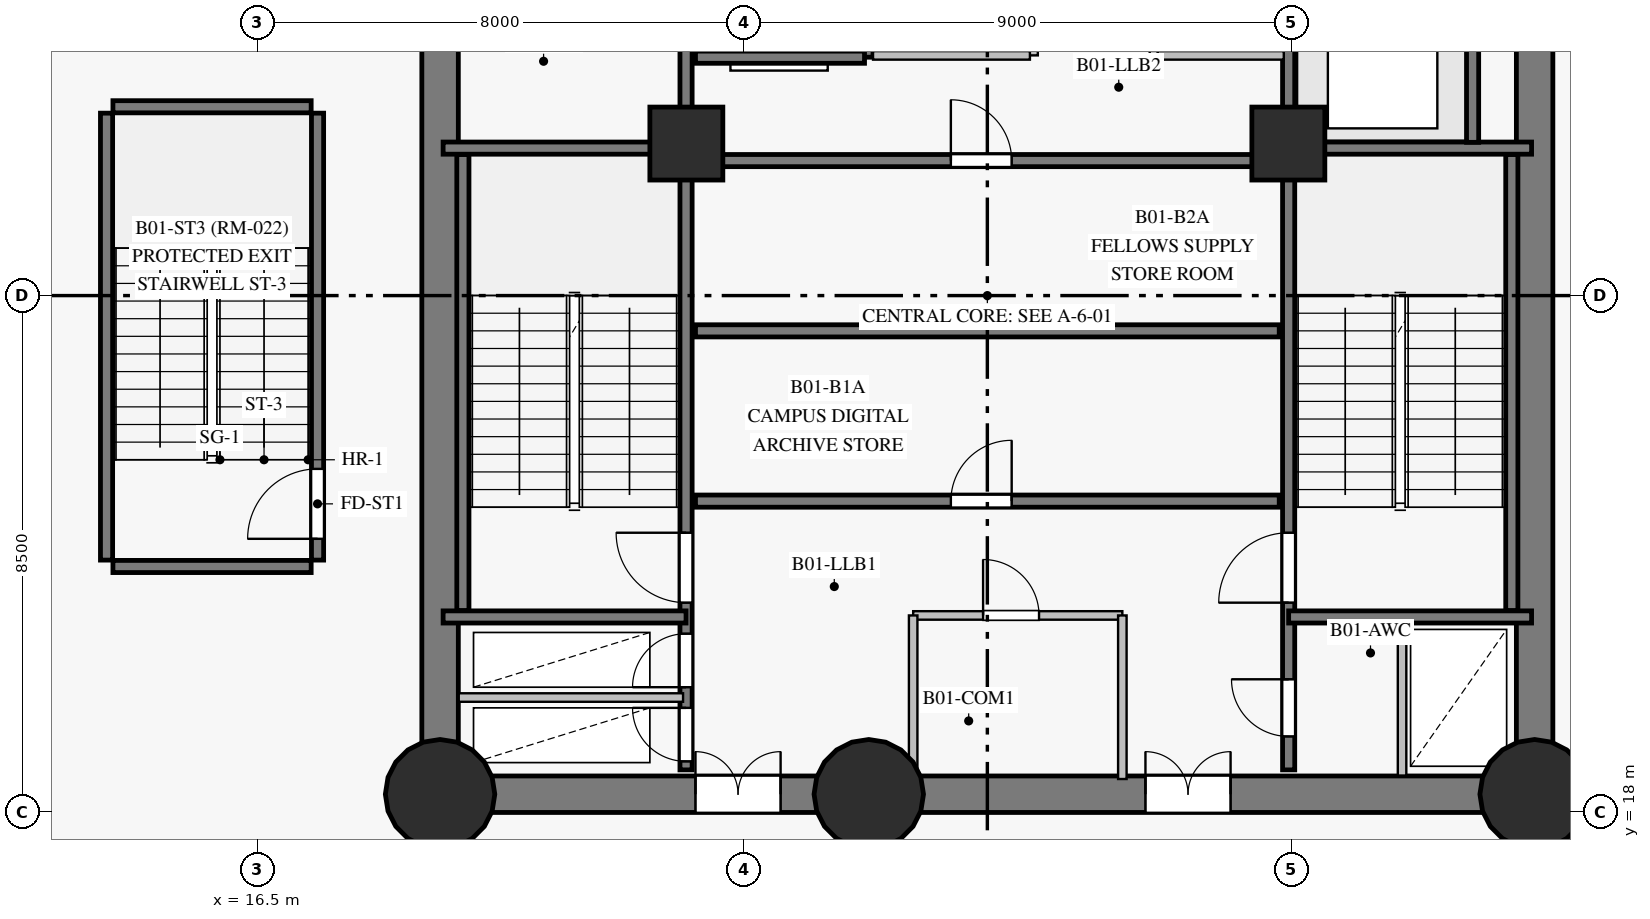
"""IFC4 building model, lengths in metres.
Left out: names, types, materials, properties, quantities, classifications, styles, units other than length and angle.
Written with IfcOpenShell. Run it as: python <this file> out.ifc"""

import sys

from ifc_helpers import new_model, si_unit, direction, frame, frame_2d, origin, origin_with_axes, origin_2d, place, context, subcontext, project, spatial, rectangle, circle, extrude, source, transform, mapped, element, fill, save


model = new_model("IFC4")
c1 = context("Model", 3, precision=1e-05, world=origin(), true_north=direction((0.0, 1.0)))
c2 = subcontext(c1, "Body", "Model", "MODEL_VIEW")
j1 = project(units=[si_unit("LENGTHUNIT", "METRE"), si_unit("PLANEANGLEUNIT", "RADIAN")], contexts=[c1])
p1 = place(None, origin())
s1 = spatial("IfcSite", under=j1, at=p1, CompositionType="ELEMENT")
p2 = place(p1, origin())
s2 = spatial("IfcBuilding", under=s1, at=p2, CompositionType="ELEMENT")
p3 = place(p2, frame((0.0, 0.0, -4.2)))
s3 = spatial("IfcBuildingStorey", under=s2, at=p3, CompositionType="ELEMENT", Elevation=-4.2)
p4 = place(p3, frame((19.5, 18.3, 0.0), z_axis=(0.0, 0.0, 1.0), x_axis=(1.0, 0.0, 0.0)))
e1 = element("IfcWall", 1, at=p4, inside=s3, PredefinedType="SHEAR", context=c2, shape_type="SweptSolid", body=[
    extrude(rectangle(XDim=7.05, YDim=0.6, at=frame_2d((3.525, 0.0))), origin(), (0.0, 0.0, 1.0), 3.85),
])
p5 = place(p4, frame((4.2, 0.0, 0.0)))
e2 = element("IfcOpeningElement", 2, at=p5, cuts=e1, PredefinedType="OPENING", context=c2, shape_type="SweptSolid", body=[
    extrude(rectangle(XDim=1.4, YDim=2.2, at=frame_2d((0.7, 1.1))), frame((0.0, 0.31, 0.0), z_axis=(0.0, -1.0, 0.0), x_axis=(1.0, 0.0, 0.0)), (0.0, 0.0, 1.0), 0.62),
])
p6 = place(p3, frame((26.55, 18.3, 0.0), z_axis=(0.0, 0.0, 1.0), x_axis=(1.0, 0.0, 0.0)))
e3 = element("IfcWall", 3, at=p6, inside=s3, PredefinedType="SHEAR", context=c2, shape_type="SweptSolid", body=[
    extrude(rectangle(XDim=10.95, YDim=0.6, at=frame_2d((5.475, 0.0))), origin(), (0.0, 0.0, 1.0), 3.85),
])
p7 = place(p6, frame((4.55, 0.0, 0.0)))
e4 = element("IfcOpeningElement", 4, at=p7, cuts=e3, PredefinedType="OPENING", context=c2, shape_type="SweptSolid", body=[
    extrude(rectangle(XDim=1.4, YDim=2.2, at=frame_2d((0.7, 1.1))), frame((0.0, 0.31, 0.0), z_axis=(0.0, -1.0, 0.0), x_axis=(1.0, 0.0, 0.0)), (0.0, 0.0, 1.0), 0.62),
])
for number, where, z_axis, x_axis in (
    (5, (37.5, 18.3, 0.0), (0.0, 0.0, 1.0), (0.0, 1.0, 0.0)),
    (6, (19.5, 34.7, 0.0), (0.0, 0.0, 1.0), (0.0, -1.0, 0.0)),
):
    element("IfcWall", number, at=place(p3, frame(where, z_axis=z_axis, x_axis=x_axis)), inside=s3, PredefinedType="SHEAR", context=c2, shape_type="SweptSolid", body=[
        extrude(rectangle(XDim=16.4, YDim=0.6, at=frame_2d((8.2, 0.0))), origin(), (0.0, 0.0, 1.0), 3.85),
    ])
m1 = source(origin_with_axes(), c2, "Body", "SweptSolid", [
    extrude(circle(Radius=0.9, at=origin_2d()), origin(), (0.0, 0.0, 1.0), 4.2),
])
for number, where, z_axis, x_axis in (
    (7, (19.5, 18.3, 0.0), (0.0, 0.0, 1.0), (1.0, 0.0, 0.0)),
    (8, (26.55, 18.3, 0.0), (0.0, 0.0, 1.0), (1.0, 0.0, 0.0)),
    (9, (37.5, 18.3, 0.0), (0.0, 0.0, 1.0), (1.0, 0.0, 0.0)),
):
    element("IfcColumn", number, at=place(p3, frame(where, z_axis=z_axis, x_axis=x_axis)), inside=s3, PredefinedType="COLUMN", context=c2, shape_type="MappedRepresentation", body=[
        mapped(m1, transform((0.0, 0.0, 0.0), scale=1.0)),
    ])
m2 = source(origin_with_axes(), c2, "Body", "SweptSolid", [
    extrude(rectangle(XDim=1.2, YDim=1.2, at=origin_2d()), origin(), (0.0, 0.0, 1.0), 4.2),
])
for number, where, z_axis, x_axis in (
    (10, (23.55, 29.0, 0.0), (0.0, 0.0, 1.0), (1.0, 0.0, 0.0)),
    (11, (33.45, 29.0, 0.0), (0.0, 0.0, 1.0), (1.0, 0.0, 0.0)),
):
    element("IfcColumn", number, at=place(p3, frame(where, z_axis=z_axis, x_axis=x_axis)), inside=s3, PredefinedType="COLUMN", context=c2, shape_type="MappedRepresentation", body=[
        mapped(m2, transform((0.0, 0.0, 0.0), scale=1.0)),
    ])
p8 = place(p3, frame((23.545, 18.7, 0.0), z_axis=(0.0, 0.0, 1.0), x_axis=(0.0, 1.0, 0.0)))
e12 = element("IfcWall", 12, at=p8, inside=s3, PredefinedType="SHEAR", context=c2, shape_type="SweptSolid", body=[
    extrude(rectangle(XDim=15.6, YDim=0.2, at=frame_2d((7.8, 0.0))), origin(), (0.0, 0.0, 1.0), 3.85),
])
p9 = place(p8, frame((2.75, 0.0, 0.0)))
e13 = element("IfcOpeningElement", 13, at=p9, cuts=e12, PredefinedType="OPENING", context=c2, shape_type="SweptSolid", body=[
    extrude(rectangle(XDim=1.15, YDim=2.15, at=frame_2d((0.575, 1.075))), frame((0.0, 0.11, 0.0), z_axis=(0.0, -1.0, 0.0), x_axis=(1.0, 0.0, 0.0)), (0.0, 0.0, 1.0), 0.22),
])
p10 = place(p8, frame((0.14, 0.0, 0.0)))
e14 = element("IfcOpeningElement", 14, at=p10, cuts=e12, PredefinedType="OPENING", context=c2, shape_type="SweptSolid", body=[
    extrude(rectangle(XDim=0.88, YDim=2.1, at=frame_2d((0.44, 1.05))), frame((0.0, 0.11, 0.0), z_axis=(0.0, -1.0, 0.0), x_axis=(1.0, 0.0, 0.0)), (0.0, 0.0, 1.0), 0.22),
])
p11 = place(p8, frame((1.36, 0.0, 0.0)))
e15 = element("IfcOpeningElement", 15, at=p11, cuts=e12, PredefinedType="OPENING", context=c2, shape_type="SweptSolid", body=[
    extrude(rectangle(XDim=0.88, YDim=2.1, at=frame_2d((0.44, 1.05))), frame((0.0, 0.11, 0.0), z_axis=(0.0, -1.0, 0.0), x_axis=(1.0, 0.0, 0.0)), (0.0, 0.0, 1.0), 0.22),
])
p12 = place(p8, frame((12.1, 0.0, 0.0)))
e16 = element("IfcOpeningElement", 16, at=p12, cuts=e12, PredefinedType="OPENING", context=c2, shape_type="SweptSolid", body=[
    extrude(rectangle(XDim=1.12, YDim=2.15, at=frame_2d((0.56, 1.075))), frame((0.0, 0.11, 0.0), z_axis=(0.0, -1.0, 0.0), x_axis=(1.0, 0.0, 0.0)), (0.0, 0.0, 1.0), 0.22),
])
p13 = place(p8, frame((14.05, 0.0, 0.0)))
e17 = element("IfcOpeningElement", 17, at=p13, cuts=e12, PredefinedType="OPENING", context=c2, shape_type="SweptSolid", body=[
    extrude(rectangle(XDim=1.12, YDim=2.15, at=frame_2d((0.56, 1.075))), frame((0.0, 0.11, 0.0), z_axis=(0.0, -1.0, 0.0), x_axis=(1.0, 0.0, 0.0)), (0.0, 0.0, 1.0), 0.22),
])
p14 = place(p3, frame((33.455, 18.7, 0.0), z_axis=(0.0, 0.0, 1.0), x_axis=(0.0, 1.0, 0.0)))
e18 = element("IfcWall", 18, at=p14, inside=s3, PredefinedType="SHEAR", context=c2, shape_type="SweptSolid", body=[
    extrude(rectangle(XDim=15.6, YDim=0.2, at=frame_2d((7.8, 0.0))), origin(), (0.0, 0.0, 1.0), 3.85),
])
p15 = place(p14, frame((2.75, 0.0, 0.0)))
e19 = element("IfcOpeningElement", 19, at=p15, cuts=e18, PredefinedType="OPENING", context=c2, shape_type="SweptSolid", body=[
    extrude(rectangle(XDim=1.15, YDim=2.15, at=frame_2d((0.575, 1.075))), frame((0.0, 0.11, 0.0), z_axis=(0.0, -1.0, 0.0), x_axis=(1.0, 0.0, 0.0)), (0.0, 0.0, 1.0), 0.22),
])
p16 = place(p14, frame((0.55, 0.0, 0.0)))
e20 = element("IfcOpeningElement", 20, at=p16, cuts=e18, PredefinedType="OPENING", context=c2, shape_type="SweptSolid", body=[
    extrude(rectangle(XDim=0.94, YDim=2.1, at=frame_2d((0.47, 1.05))), frame((0.0, 0.11, 0.0), z_axis=(0.0, -1.0, 0.0), x_axis=(1.0, 0.0, 0.0)), (0.0, 0.0, 1.0), 0.22),
])
p17 = place(p3, frame((23.7, 23.12, 0.0), z_axis=(0.0, 0.0, 1.0), x_axis=(1.0, 0.0, 0.0)))
e21 = element("IfcWall", 21, at=p17, inside=s3, PredefinedType="SHEAR", context=c2, shape_type="SweptSolid", body=[
    extrude(rectangle(XDim=9.6, YDim=0.2, at=frame_2d((4.8, 0.0))), origin(), (0.0, 0.0, 1.0), 3.85),
])
p18 = place(p17, frame((4.2, 0.0, 0.0)))
e22 = element("IfcOpeningElement", 22, at=p18, cuts=e21, PredefinedType="OPENING", context=c2, shape_type="SweptSolid", body=[
    extrude(rectangle(XDim=1.0, YDim=2.15, at=frame_2d((0.5, 1.075))), frame((0.0, 0.11, 0.0), z_axis=(0.0, -1.0, 0.0), x_axis=(1.0, 0.0, 0.0)), (0.0, 0.0, 1.0), 0.22),
])
p19 = place(p3, frame((23.7, 25.92, 0.0), z_axis=(0.0, 0.0, 1.0), x_axis=(1.0, 0.0, 0.0)))
e23 = element("IfcWall", 23, at=p19, inside=s3, PredefinedType="SHEAR", context=c2, shape_type="SweptSolid", body=[
    extrude(rectangle(XDim=9.6, YDim=0.2, at=frame_2d((4.8, 0.0))), origin(), (0.0, 0.0, 1.0), 3.85),
])
p20 = place(p3, frame((23.7, 28.72, 0.0), z_axis=(0.0, 0.0, 1.0), x_axis=(1.0, 0.0, 0.0)))
e24 = element("IfcWall", 24, at=p20, inside=s3, PredefinedType="SHEAR", context=c2, shape_type="SweptSolid", body=[
    extrude(rectangle(XDim=9.6, YDim=0.2, at=frame_2d((4.8, 0.0))), origin(), (0.0, 0.0, 1.0), 3.85),
])
p21 = place(p20, frame((4.2, 0.0, 0.0)))
e25 = element("IfcOpeningElement", 25, at=p21, cuts=e24, PredefinedType="OPENING", context=c2, shape_type="SweptSolid", body=[
    extrude(rectangle(XDim=1.0, YDim=2.15, at=frame_2d((0.5, 1.075))), frame((0.0, 0.11, 0.0), z_axis=(0.0, -1.0, 0.0), x_axis=(1.0, 0.0, 0.0)), (0.0, 0.0, 1.0), 0.22),
])
for number, where, z_axis, x_axis in (
    (26, (19.875, 21.32, 0.0), (0.0, 0.0, 1.0), (0.0, 1.0, 0.0)),
    (27, (37.125, 21.32, 0.0), (0.0, 0.0, 1.0), (0.0, 1.0, 0.0)),
):
    element("IfcWall", number, at=place(p3, frame(where, z_axis=z_axis, x_axis=x_axis)), inside=s3, PredefinedType="SHEAR", context=c2, shape_type="SweptSolid", body=[
        extrude(rectangle(XDim=7.5, YDim=0.2, at=frame_2d((3.75, 0.0))), origin(), (0.0, 0.0, 1.0), 3.85),
    ])
p22 = place(p3, frame((14.015, 22.15, 0.0), z_axis=(0.0, 0.0, 1.0), x_axis=(0.0, 1.0, 0.0)))
e28 = element("IfcWall", 28, at=p22, inside=s3, PredefinedType="SHEAR", context=c2, shape_type="SweptSolid", body=[
    extrude(rectangle(XDim=7.35, YDim=0.2, at=frame_2d((3.675, 0.0))), origin(), (0.0, 0.0, 1.0), 3.85),
])
p23 = place(p3, frame((17.485, 22.15, 0.0), z_axis=(0.0, 0.0, 1.0), x_axis=(0.0, 1.0, 0.0)))
e29 = element("IfcWall", 29, at=p23, inside=s3, PredefinedType="SHEAR", context=c2, shape_type="SweptSolid", body=[
    extrude(rectangle(XDim=7.35, YDim=0.2, at=frame_2d((3.675, 0.0))), origin(), (0.0, 0.0, 1.0), 3.85),
])
p24 = place(p23, frame((0.35, 0.0, 0.0)))
e30 = element("IfcOpeningElement", 30, at=p24, cuts=e29, PredefinedType="OPENING", context=c2, shape_type="SweptSolid", body=[
    extrude(rectangle(XDim=1.15, YDim=2.15, at=frame_2d((0.575, 1.075))), frame((0.0, 0.11, 0.0), z_axis=(0.0, -1.0, 0.0), x_axis=(1.0, 0.0, 0.0)), (0.0, 0.0, 1.0), 0.22),
])
for number, where, z_axis, x_axis in (
    (31, (33.455, 21.215, 0.0), (0.0, 0.0, 1.0), (1.0, 0.0, 0.0)),
    (32, (33.455, 28.925, 0.0), (0.0, 0.0, 1.0), (1.0, 0.0, 0.0)),
    (33, (19.55, 21.215, 0.0), (0.0, 0.0, 1.0), (1.0, 0.0, 0.0)),
    (34, (19.55, 28.925, 0.0), (0.0, 0.0, 1.0), (1.0, 0.0, 0.0)),
):
    element("IfcWall", number, at=place(p3, frame(where, z_axis=z_axis, x_axis=x_axis)), inside=s3, PredefinedType="SHEAR", context=c2, shape_type="SweptSolid", body=[
        extrude(rectangle(XDim=3.995, YDim=0.2, at=frame_2d((1.998, 0.0))), origin(), (0.0, 0.0, 1.0), 3.85),
    ])
p25 = place(p3, frame((26.52, 30.42, 0.0), z_axis=(0.0, 0.0, 1.0), x_axis=(0.0, 1.0, 0.0)))
e35 = element("IfcWall", 35, at=p25, inside=s3, PredefinedType="SHEAR", context=c2, shape_type="SweptSolid", body=[
    extrude(rectangle(XDim=3.86, YDim=0.2, at=frame_2d((1.93, 0.0))), origin(), (0.0, 0.0, 1.0), 3.85),
])
for number, where, z_axis, x_axis in (
    (36, (14.12, 22.045, 0.0), (0.0, 0.0, 1.0), (1.0, 0.0, 0.0)),
    (37, (14.12, 29.605, 0.0), (0.0, 0.0, 1.0), (1.0, 0.0, 0.0)),
):
    element("IfcWall", number, at=place(p3, frame(where, z_axis=z_axis, x_axis=x_axis)), inside=s3, PredefinedType="SHEAR", context=c2, shape_type="SweptSolid", body=[
        extrude(rectangle(XDim=3.26, YDim=0.2, at=frame_2d((1.63, 0.0))), origin(), (0.0, 0.0, 1.0), 3.85),
    ])
p26 = place(p3, frame((36.48, 29.02, 0.0), z_axis=(0.0, 0.0, 1.0), x_axis=(0.0, 1.0, 0.0)))
e38 = element("IfcWall", 38, at=p26, inside=s3, PredefinedType="SHEAR", context=c2, shape_type="SweptSolid", body=[
    extrude(rectangle(XDim=2.86, YDim=0.2, at=frame_2d((1.43, 0.0))), origin(), (0.0, 0.0, 1.0), 3.85),
])
p27 = place(p3, frame((23.7, 30.42, 0.0), z_axis=(0.0, 0.0, 1.0), x_axis=(1.0, 0.0, 0.0)))
e39 = element("IfcWall", 39, at=p27, inside=s3, PredefinedType="SHEAR", context=c2, shape_type="SweptSolid", body=[
    extrude(rectangle(XDim=2.78, YDim=0.2, at=frame_2d((1.39, 0.0))), origin(), (0.0, 0.0, 1.0), 3.85),
])
for number, where, z_axis, x_axis in (
    (40, (29.26, 30.45, 0.0), (0.0, 0.0, 1.0), (0.0, 1.0, 0.0)),
    (41, (31.24, 30.45, 0.0), (0.0, 0.0, 1.0), (0.0, 1.0, 0.0)),
):
    element("IfcWall", number, at=place(p3, frame(where, z_axis=z_axis, x_axis=x_axis)), inside=s3, PredefinedType="PARTITIONING", context=c2, shape_type="SweptSolid", body=[
        extrude(rectangle(XDim=3.943, YDim=0.14, at=frame_2d((1.972, 0.0))), origin(), (0.0, 0.0, 1.0), 3.85),
    ])
p28 = place(p3, frame((19.807, 19.89, 0.0), z_axis=(0.0, 0.0, 1.0), x_axis=(1.0, 0.0, 0.0)))
e42 = element("IfcWall", 42, at=p28, inside=s3, PredefinedType="PARTITIONING", context=c2, shape_type="SweptSolid", body=[
    extrude(rectangle(XDim=3.689, YDim=0.14, at=frame_2d((1.844, 0.0))), origin(), (0.0, 0.0, 1.0), 3.85),
])
p29 = place(p3, frame((27.28, 21.24, 0.0), z_axis=(0.0, 0.0, 1.0), x_axis=(1.0, 0.0, 0.0)))
e43 = element("IfcWall", 43, at=p29, inside=s3, PredefinedType="PARTITIONING", context=c2, shape_type="SweptSolid", body=[
    extrude(rectangle(XDim=3.44, YDim=0.14, at=frame_2d((1.72, 0.0))), origin(), (0.0, 0.0, 1.0), 3.85),
])
p30 = place(p29, frame((1.15, 0.0, 0.0)))
e44 = element("IfcOpeningElement", 44, at=p30, cuts=e43, PredefinedType="OPENING", context=c2, shape_type="SweptSolid", body=[
    extrude(rectangle(XDim=0.92, YDim=2.1, at=frame_2d((0.46, 1.05))), frame((0.0, 0.08, 0.0), z_axis=(0.0, -1.0, 0.0), x_axis=(1.0, 0.0, 0.0)), (0.0, 0.0, 1.0), 0.16),
])
for number, where, z_axis, x_axis in (
    (45, (27.28, 18.55, 0.0), (0.0, 0.0, 1.0), (0.0, 1.0, 0.0)),
    (46, (30.72, 18.55, 0.0), (0.0, 0.0, 1.0), (0.0, 1.0, 0.0)),
):
    element("IfcWall", number, at=place(p3, frame(where, z_axis=z_axis, x_axis=x_axis)), inside=s3, PredefinedType="PARTITIONING", context=c2, shape_type="SweptSolid", body=[
        extrude(rectangle(XDim=2.69, YDim=0.14, at=frame_2d((1.345, 0.0))), origin(), (0.0, 0.0, 1.0), 3.85),
    ])
p31 = place(p3, frame((26.62, 30.45, 0.0), z_axis=(0.0, 0.0, 1.0), x_axis=(1.0, 0.0, 0.0)))
e47 = element("IfcWall", 47, at=p31, inside=s3, PredefinedType="PARTITIONING", context=c2, shape_type="SweptSolid", body=[
    extrude(rectangle(XDim=2.58, YDim=0.14, at=frame_2d((1.29, 0.0))), origin(), (0.0, 0.0, 1.0), 3.85),
])
p32 = place(p3, frame((35.32, 18.607, 0.0), z_axis=(0.0, 0.0, 1.0), x_axis=(0.0, 1.0, 0.0)))
e48 = element("IfcWall", 48, at=p32, inside=s3, PredefinedType="PARTITIONING", context=c2, shape_type="SweptSolid", body=[
    extrude(rectangle(XDim=2.503, YDim=0.14, at=frame_2d((1.251, 0.0))), origin(), (0.0, 0.0, 1.0), 3.85),
])
p33 = place(p3, frame((31.3, 30.45, 0.0), z_axis=(0.0, 0.0, 1.0), x_axis=(1.0, 0.0, 0.0)))
e49 = element("IfcWall", 49, at=p33, inside=s3, PredefinedType="PARTITIONING", context=c2, shape_type="SweptSolid", body=[
    extrude(rectangle(XDim=2.075, YDim=0.14, at=frame_2d((1.038, 0.0))), origin(), (0.0, 0.0, 1.0), 3.85),
])
m3 = source(origin_with_axes(), c2, "Body", "SweptSolid", [
    extrude(rectangle(XDim=1.15, YDim=2.15, at=frame_2d((0.575, 1.075))), frame((0.0, 0.025, 0.0), z_axis=(0.0, -1.0, 0.0), x_axis=(1.0, 0.0, 0.0)), (0.0, 0.0, 1.0), 0.05),
])
p34 = place(p9, origin())
e50 = element("IfcDoor", 50, at=p34, inside=s3, OperationType="SINGLE_SWING_RIGHT", PredefinedType="DOOR", context=c2, shape_type="MappedRepresentation", body=[
    mapped(m3, transform((0.0, 0.0, 0.0), scale=1.0)),
])
fill(e13, e50)
p35 = place(p15, origin())
e51 = element("IfcDoor", 51, at=p35, inside=s3, OperationType="SINGLE_SWING_LEFT", PredefinedType="DOOR", context=c2, shape_type="MappedRepresentation", body=[
    mapped(m3, transform((0.0, 0.0, 0.0), scale=1.0)),
])
fill(e19, e51)
m4 = source(origin_with_axes(), c2, "Body", "SweptSolid", [
    extrude(rectangle(XDim=0.88, YDim=2.1, at=frame_2d((0.44, 1.05))), frame((0.0, 0.025, 0.0), z_axis=(0.0, -1.0, 0.0), x_axis=(1.0, 0.0, 0.0)), (0.0, 0.0, 1.0), 0.05),
])
p36 = place(p10, origin())
e52 = element("IfcDoor", 52, at=p36, inside=s3, OperationType="SINGLE_SWING_RIGHT", PredefinedType="DOOR", context=c2, shape_type="MappedRepresentation", body=[
    mapped(m4, transform((0.0, 0.0, 0.0), scale=1.0)),
])
fill(e14, e52)
p37 = place(p11, origin())
e53 = element("IfcDoor", 53, at=p37, inside=s3, OperationType="SINGLE_SWING_LEFT", PredefinedType="DOOR", context=c2, shape_type="MappedRepresentation", body=[
    mapped(m4, transform((0.0, 0.0, 0.0), scale=1.0)),
])
fill(e15, e53)
m5 = source(origin_with_axes(), c2, "Body", "SweptSolid", [
    extrude(rectangle(XDim=1.4, YDim=2.2, at=frame_2d((0.7, 1.1))), frame((0.0, 0.025, 0.0), z_axis=(0.0, -1.0, 0.0), x_axis=(1.0, 0.0, 0.0)), (0.0, 0.0, 1.0), 0.05),
])
p38 = place(p5, origin())
e54 = element("IfcDoor", 54, at=p38, inside=s3, OperationType="DOUBLE_DOOR_SINGLE_SWING", PredefinedType="DOOR", context=c2, shape_type="MappedRepresentation", body=[
    mapped(m5, transform((0.0, 0.0, 0.0), scale=1.0)),
])
fill(e2, e54)
p39 = place(p7, origin())
e55 = element("IfcDoor", 55, at=p39, inside=s3, OperationType="DOUBLE_DOOR_SINGLE_SWING", PredefinedType="DOOR", context=c2, shape_type="MappedRepresentation", body=[
    mapped(m5, transform((0.0, 0.0, 0.0), scale=1.0)),
])
fill(e4, e55)
m6 = source(origin_with_axes(), c2, "Body", "SweptSolid", [
    extrude(rectangle(XDim=0.94, YDim=2.1, at=frame_2d((0.47, 1.05))), frame((0.0, 0.025, 0.0), z_axis=(0.0, -1.0, 0.0), x_axis=(1.0, 0.0, 0.0)), (0.0, 0.0, 1.0), 0.05),
])
p40 = place(p16, origin())
e56 = element("IfcDoor", 56, at=p40, inside=s3, OperationType="SINGLE_SWING_RIGHT", PredefinedType="DOOR", context=c2, shape_type="MappedRepresentation", body=[
    mapped(m6, transform((0.0, 0.0, 0.0), scale=1.0)),
])
fill(e20, e56)
m7 = source(origin_with_axes(), c2, "Body", "SweptSolid", [
    extrude(rectangle(XDim=0.92, YDim=2.1, at=frame_2d((0.46, 1.05))), frame((0.0, 0.025, 0.0), z_axis=(0.0, -1.0, 0.0), x_axis=(1.0, 0.0, 0.0)), (0.0, 0.0, 1.0), 0.05),
])
p41 = place(p30, origin())
e57 = element("IfcDoor", 57, at=p41, inside=s3, OperationType="SINGLE_SWING_LEFT", PredefinedType="DOOR", context=c2, shape_type="MappedRepresentation", body=[
    mapped(m7, transform((0.0, 0.0, 0.0), scale=1.0)),
])
fill(e44, e57)
m8 = source(origin_with_axes(), c2, "Body", "SweptSolid", [
    extrude(rectangle(XDim=1.0, YDim=2.15, at=frame_2d((0.5, 1.075))), frame((0.0, 0.025, 0.0), z_axis=(0.0, -1.0, 0.0), x_axis=(1.0, 0.0, 0.0)), (0.0, 0.0, 1.0), 0.05),
])
p42 = place(p18, origin())
e58 = element("IfcDoor", 58, at=p42, inside=s3, OperationType="SINGLE_SWING_RIGHT", PredefinedType="DOOR", context=c2, shape_type="MappedRepresentation", body=[
    mapped(m8, transform((0.0, 0.0, 0.0), scale=1.0)),
])
fill(e22, e58)
p43 = place(p21, origin())
e59 = element("IfcDoor", 59, at=p43, inside=s3, OperationType="SINGLE_SWING_LEFT", PredefinedType="DOOR", context=c2, shape_type="MappedRepresentation", body=[
    mapped(m8, transform((0.0, 0.0, 0.0), scale=1.0)),
])
fill(e25, e59)
p44 = place(p24, origin())
e60 = element("IfcDoor", 60, at=p44, inside=s3, OperationType="SINGLE_SWING_LEFT", PredefinedType="DOOR", context=c2, shape_type="MappedRepresentation", body=[
    mapped(m3, transform((0.0, 0.0, 0.0), scale=1.0)),
])
fill(e30, e60)
save(model, sys.argv[1])
